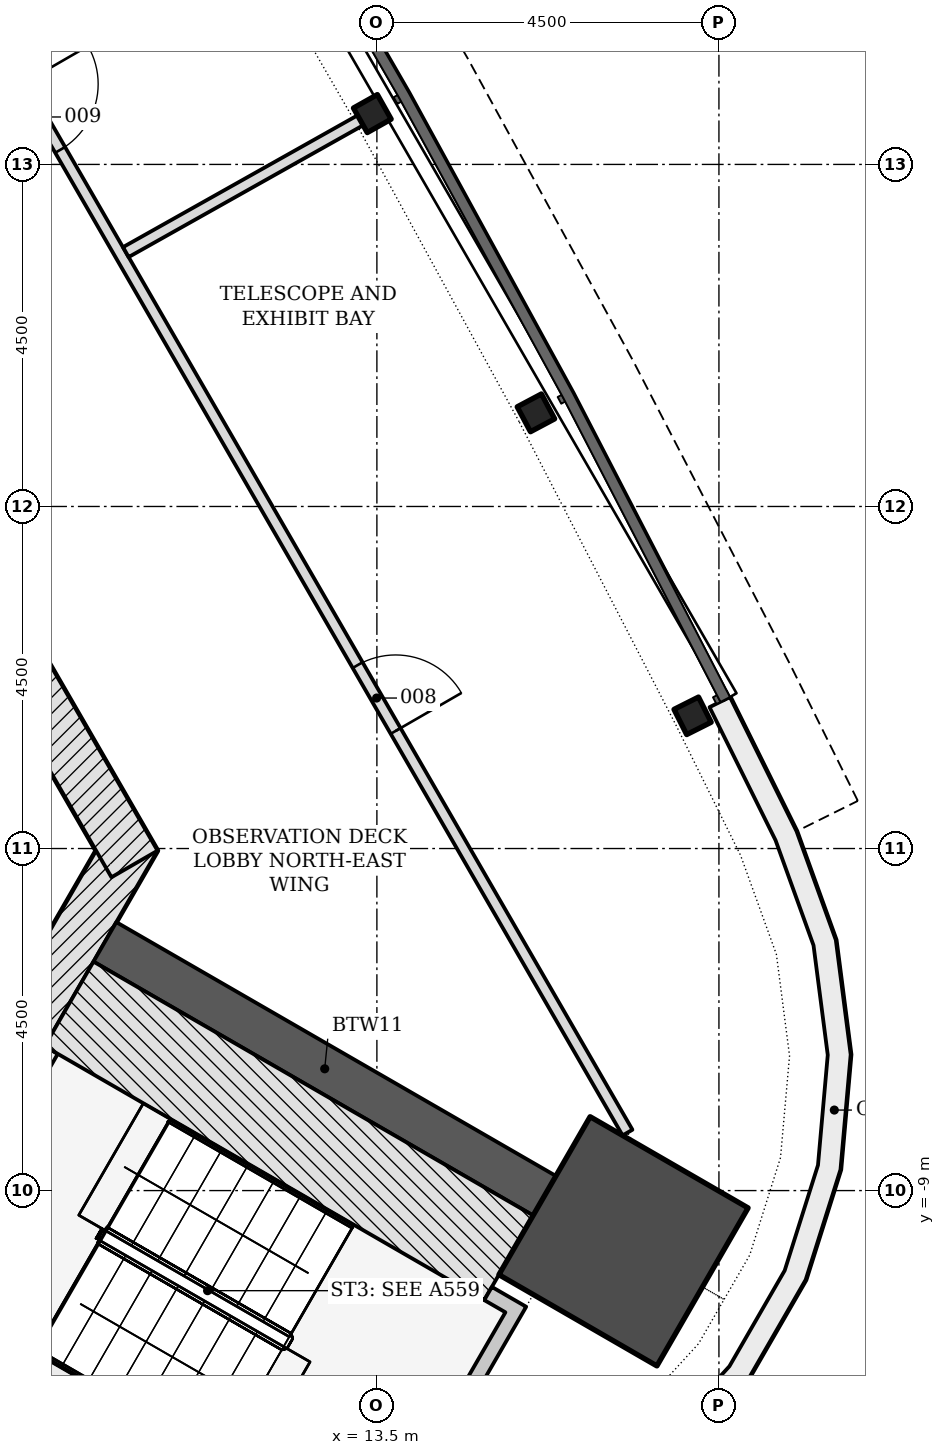
"""IFC4 building model, lengths in metres.
Left out: names, types, materials, properties, quantities, classifications, styles, units other than length and angle.
Written with IfcOpenShell. Run it as: python <this file> out.ifc"""

import sys

from ifc_helpers import new_model, si_unit, direction, frame, frame_2d, origin, origin_2d, place, context, subcontext, project, spatial, polyline, rectangle, i_section, outline, extrude, element, fill, save


model = new_model("IFC4")
c1 = context("Model", 3, precision=1e-05, world=origin(), true_north=direction((0.0, 1.0)))
c2 = subcontext(c1, "Body", "Model", "MODEL_VIEW")
j1 = project(units=[si_unit("LENGTHUNIT", "METRE"), si_unit("PLANEANGLEUNIT", "RADIAN")], contexts=[c1])
p1 = place(None, origin())
s1 = spatial("IfcSite", under=j1, at=p1, CompositionType="ELEMENT")
p2 = place(p1, origin())
s2 = spatial("IfcBuilding", under=s1, at=p2, CompositionType="ELEMENT")
p3 = place(p2, frame((0.0, 0.0, 274.2)))
s3 = spatial("IfcBuildingStorey", under=s2, at=p3, CompositionType="ELEMENT", Elevation=274.2)
p4 = place(p3, frame((8.926, -6.753, -0.2), z_axis=(0.0, 0.0, 1.0), x_axis=(0.500042739161, 0.866000726912, 0.0)))
e1 = element("IfcWall", 1, at=p4, inside=s3, PredefinedType="SHEAR", context=c2, shape_type="SweptSolid", body=[
    extrude(rectangle(XDim=2.771, YDim=0.7, at=frame_2d((1.386, 0.0))), origin(), (0.0, 0.0, 1.0), 5.35),
])
p5 = place(p3, frame((10.311, -4.703, -0.2), z_axis=(0.0, 0.0, 1.0), x_axis=(-0.500001446645, 0.866024568562, 0.0)))
e2 = element("IfcWall", 2, at=p5, inside=s3, PredefinedType="SHEAR", context=c2, shape_type="SweptSolid", body=[
    extrude(rectangle(XDim=18.458, YDim=0.7, at=frame_2d((9.229, 0.0))), origin(), (0.0, 0.0, 1.0), 5.35),
])
p6 = place(p5, frame((4.379, 0.0, 0.2)))
e3 = element("IfcOpeningElement", 3, at=p6, cuts=e2, PredefinedType="OPENING", context=c2, shape_type="SweptSolid", body=[
    extrude(rectangle(XDim=1.1, YDim=2.1, at=frame_2d((0.55, 1.05))), frame((0.0, 0.36, 0.0), z_axis=(0.0, -1.0, 0.0), x_axis=(1.0, 0.0, 0.0)), (0.0, 0.0, 1.0), 0.72),
])
p7 = place(p5, frame((6.529, 0.0, 0.2)))
e4 = element("IfcOpeningElement", 4, at=p7, cuts=e2, PredefinedType="OPENING", context=c2, shape_type="SweptSolid", body=[
    extrude(rectangle(XDim=1.1, YDim=2.1, at=frame_2d((0.55, 1.05))), frame((0.0, 0.36, 0.0), z_axis=(0.0, -1.0, 0.0), x_axis=(1.0, 0.0, 0.0)), (0.0, 0.0, 1.0), 0.72),
])
p8 = place(p5, frame((8.679, 0.0, 0.2)))
e5 = element("IfcOpeningElement", 5, at=p8, cuts=e2, PredefinedType="OPENING", context=c2, shape_type="SweptSolid", body=[
    extrude(rectangle(XDim=1.1, YDim=2.1, at=frame_2d((0.55, 1.05))), frame((0.0, 0.36, 0.0), z_axis=(0.0, -1.0, 0.0), x_axis=(1.0, 0.0, 0.0)), (0.0, 0.0, 1.0), 0.72),
])
p9 = place(p5, frame((10.829, 0.0, 0.2)))
e6 = element("IfcOpeningElement", 6, at=p9, cuts=e2, PredefinedType="OPENING", context=c2, shape_type="SweptSolid", body=[
    extrude(rectangle(XDim=1.1, YDim=2.1, at=frame_2d((0.55, 1.05))), frame((0.0, 0.36, 0.0), z_axis=(0.0, -1.0, 0.0), x_axis=(1.0, 0.0, 0.0)), (0.0, 0.0, 1.0), 0.72),
])
p10 = place(p5, frame((12.979, 0.0, 0.2)))
e7 = element("IfcOpeningElement", 7, at=p10, cuts=e2, PredefinedType="OPENING", context=c2, shape_type="SweptSolid", body=[
    extrude(rectangle(XDim=1.1, YDim=2.1, at=frame_2d((0.55, 1.05))), frame((0.0, 0.36, 0.0), z_axis=(0.0, -1.0, 0.0), x_axis=(1.0, 0.0, 0.0)), (0.0, 0.0, 1.0), 0.72),
])
p11 = place(p3, frame((9.922, -5.728, -0.2), z_axis=(0.0, 0.0, 1.0), x_axis=(0.866032176823, -0.499988268569, 0.0)))
e8 = element("IfcWall", 8, at=p11, inside=s3, PredefinedType="SHEAR", context=c2, shape_type="SweptSolid", body=[
    extrude(rectangle(XDim=6.678, YDim=0.6, at=frame_2d((3.339, 0.0))), origin(), (0.0, 0.0, 1.0), 5.35),
])
p12 = place(p3, frame((16.745, -9.667, -0.2), z_axis=(0.0, 0.0, 1.0), x_axis=(0.866025403784, -0.5, 0.0)))
e9 = element("IfcColumn", 9, at=p12, inside=s3, PredefinedType="COLUMN", context=c2, shape_type="SweptSolid", body=[
    extrude(rectangle(XDim=2.4, YDim=2.4, at=origin_2d()), origin(), (0.0, 0.0, 1.0), 5.35),
])
for number, where, z_axis, x_axis in (
    (10, (17.654, -2.754, -0.2), (0.0, 0.0, 1.0), (-0.449, 0.894, 0.0)),
    (11, (15.593, 1.232, -0.2), (0.0, 0.0, 1.0), (-0.47, 0.883, 0.0)),
    (12, (13.44, 5.169, -0.2), (0.0, 0.0, 1.0), (-0.49, 0.872, 0.0)),
):
    element("IfcColumn", number, at=place(p3, frame(where, z_axis=z_axis, x_axis=x_axis)), inside=s3, PredefinedType="COLUMN", context=c2, shape_type="SweptSolid", body=[
        extrude(i_section(OverallWidth=0.371, OverallDepth=0.361, WebThickness=0.012, FlangeThickness=0.02, FilletRadius=0.015, at=origin_2d()), origin(), (0.0, 0.0, 1.0), 5.35),
    ])
p13 = place(p3, origin())
e13 = element("IfcWall", 13, at=p13, inside=s3, PredefinedType="NOTDEFINED", context=c2, shape_type="SweptSolid", body=[
    extrude(outline(polyline([(11.244, -14.46), (13.211, -14.336), (14.708, -14.069), (16.111, -13.485), (17.355, -12.611), (18.381, -11.49), (19.141, -10.174), (19.599, -8.724), (19.733, -7.21), (19.538, -5.703), (19.021, -4.273), (18.145, -2.507), (17.876, -2.64), (18.745, -4.391), (19.244, -5.774), (19.432, -7.216), (19.303, -8.665), (18.865, -10.052), (18.138, -11.312), (17.156, -12.385), (15.965, -13.22), (14.623, -13.779), (13.176, -14.038), (11.225, -14.161), (11.244, -14.46)])), origin(), (0.0, 0.0, 1.0), 5.15),
])
p14 = place(p3, frame((7.44, -10.226, -0.2), z_axis=(0.0, 0.0, 1.0), x_axis=(0.500022077904, 0.866012656725, 0.0)))
e14 = element("IfcWall", 14, at=p14, inside=s3, PredefinedType="SHEAR", context=c2, shape_type="SweptSolid", body=[
    extrude(rectangle(XDim=3.55, YDim=0.2, at=frame_2d((1.775, 0.0))), origin(), (0.0, 0.0, 1.0), 5.35),
])
p15 = place(p14, frame((1.175, 0.0, 0.2)))
e15 = element("IfcOpeningElement", 15, at=p15, cuts=e14, PredefinedType="OPENING", context=c2, shape_type="SweptSolid", body=[
    extrude(rectangle(XDim=1.2, YDim=2.1, at=frame_2d((0.6, 1.05))), frame((0.0, 0.11, 0.0), z_axis=(0.0, -1.0, 0.0), x_axis=(1.0, 0.0, 0.0)), (0.0, 0.0, 1.0), 0.22),
])
p16 = place(p3, frame((7.304, -10.262, -0.2), z_axis=(0.0, 0.0, 1.0), x_axis=(0.866026594901, -0.49999793692, 0.0)))
e16 = element("IfcWall", 16, at=p16, inside=s3, PredefinedType="SHEAR", context=c2, shape_type="SweptSolid", body=[
    extrude(rectangle(XDim=5.6, YDim=0.2, at=frame_2d((2.8, 0.0))), origin(), (0.0, 0.0, 1.0), 5.35),
])
p17 = place(p16, frame((0.45, 0.0, 0.2)))
e17 = element("IfcOpeningElement", 17, at=p17, cuts=e16, PredefinedType="OPENING", context=c2, shape_type="SweptSolid", body=[
    extrude(rectangle(XDim=1.2, YDim=2.1, at=frame_2d((0.6, 1.05))), frame((0.0, 0.11, 0.0), z_axis=(0.0, -1.0, 0.0), x_axis=(1.0, 0.0, 0.0)), (0.0, 0.0, 1.0), 0.22),
])
p18 = place(p3, frame((9.45, -6.545, -0.2), z_axis=(0.0, 0.0, 1.0), x_axis=(0.866016347338, -0.500015685897, 0.0)))
e18 = element("IfcWall", 18, at=p18, inside=s3, PredefinedType="SHEAR", context=c2, shape_type="SweptSolid", body=[
    extrude(rectangle(XDim=6.678, YDim=1.286, at=frame_2d((3.339, 0.0))), origin(), (0.0, 0.0, 1.0), 5.35),
])
p19 = place(p3, frame((0.0, 0.0, -0.2)))
e19 = element("IfcWall", 19, at=p19, inside=s3, PredefinedType="SHEAR", context=c2, shape_type="SweptSolid", body=[
    extrude(outline(polyline([(12.104, -13.149), (14.289, -12.563), (15.464, -10.528), (15.013, -10.268), (14.913, -10.441), (15.191, -10.601), (14.157, -12.392), (12.132, -12.934), (12.204, -12.976), (12.204, -12.976), (12.204, -12.976), (12.204, -12.976), (12.204, -12.976), (12.204, -12.976), (12.204, -12.976), (12.204, -12.976), (12.204, -12.976), (12.204, -12.976), (12.204, -12.976), (12.204, -12.976), (12.204, -12.976), (12.204, -12.976), (12.204, -12.976), (12.204, -12.976), (12.204, -12.976), (12.104, -13.149)])), origin(), (0.0, 0.0, 1.0), 5.35),
])
p20 = place(p3, frame((6.078, 10.329, 0.0), z_axis=(0.0, 0.0, 1.0), x_axis=(0.499992222505, -0.866029894076, 0.0)))
e20 = element("IfcWall", 20, at=p20, inside=s3, PredefinedType="PARTITIONING", context=c2, shape_type="SweptSolid", body=[
    extrude(rectangle(XDim=21.439, YDim=0.15, at=frame_2d((10.719, 0.0))), origin(), (0.0, 0.0, 1.0), 4.602),
])
p21 = place(p20, frame((14.337, 0.0, 0.0)))
e21 = element("IfcOpeningElement", 21, at=p21, cuts=e20, PredefinedType="OPENING", context=c2, shape_type="SweptSolid", body=[
    extrude(rectangle(XDim=1.0, YDim=2.1, at=frame_2d((0.5, 1.05))), frame((0.0, 0.085, 0.0), z_axis=(0.0, -1.0, 0.0), x_axis=(1.0, 0.0, 0.0)), (0.0, 0.0, 1.0), 0.17),
])
p22 = place(p20, frame((5.51, 0.0, 0.0)))
e22 = element("IfcOpeningElement", 22, at=p22, cuts=e20, PredefinedType="OPENING", context=c2, shape_type="SweptSolid", body=[
    extrude(rectangle(XDim=1.0, YDim=2.1, at=frame_2d((0.5, 1.05))), frame((0.0, 0.085, 0.0), z_axis=(0.0, -1.0, 0.0), x_axis=(1.0, 0.0, 0.0)), (0.0, 0.0, 1.0), 0.17),
])
p23 = place(p3, frame((10.197, 3.346, 0.0), z_axis=(0.0, 0.0, 1.0), x_axis=(0.871768609547, 0.489917841488, 0.0)))
e23 = element("IfcWall", 23, at=p23, inside=s3, PredefinedType="PARTITIONING", context=c2, shape_type="SweptSolid", body=[
    extrude(rectangle(XDim=3.545, YDim=0.15, at=frame_2d((1.772, 0.0))), origin(), (0.0, 0.0, 1.0), 4.602),
])
p24 = place(p21, origin())
e24 = element("IfcDoor", 24, at=p24, inside=s3, OperationType="SINGLE_SWING_RIGHT", PredefinedType="DOOR", context=c2, shape_type="SweptSolid", body=[
    extrude(rectangle(XDim=1.0, YDim=2.1, at=frame_2d((0.5, 1.05))), frame((0.0, 0.025, 0.0), z_axis=(0.0, -1.0, 0.0), x_axis=(1.0, 0.0, 0.0)), (0.0, 0.0, 1.0), 0.05),
])
fill(e21, e24)
p25 = place(p22, origin())
e25 = element("IfcDoor", 25, at=p25, inside=s3, OperationType="SINGLE_SWING_LEFT", PredefinedType="DOOR", context=c2, shape_type="SweptSolid", body=[
    extrude(rectangle(XDim=1.0, YDim=2.1, at=frame_2d((0.5, 1.05))), frame((0.0, 0.025, 0.0), z_axis=(0.0, -1.0, 0.0), x_axis=(1.0, 0.0, 0.0)), (0.0, 0.0, 1.0), 0.05),
])
fill(e22, e25)
save(model, sys.argv[1])
